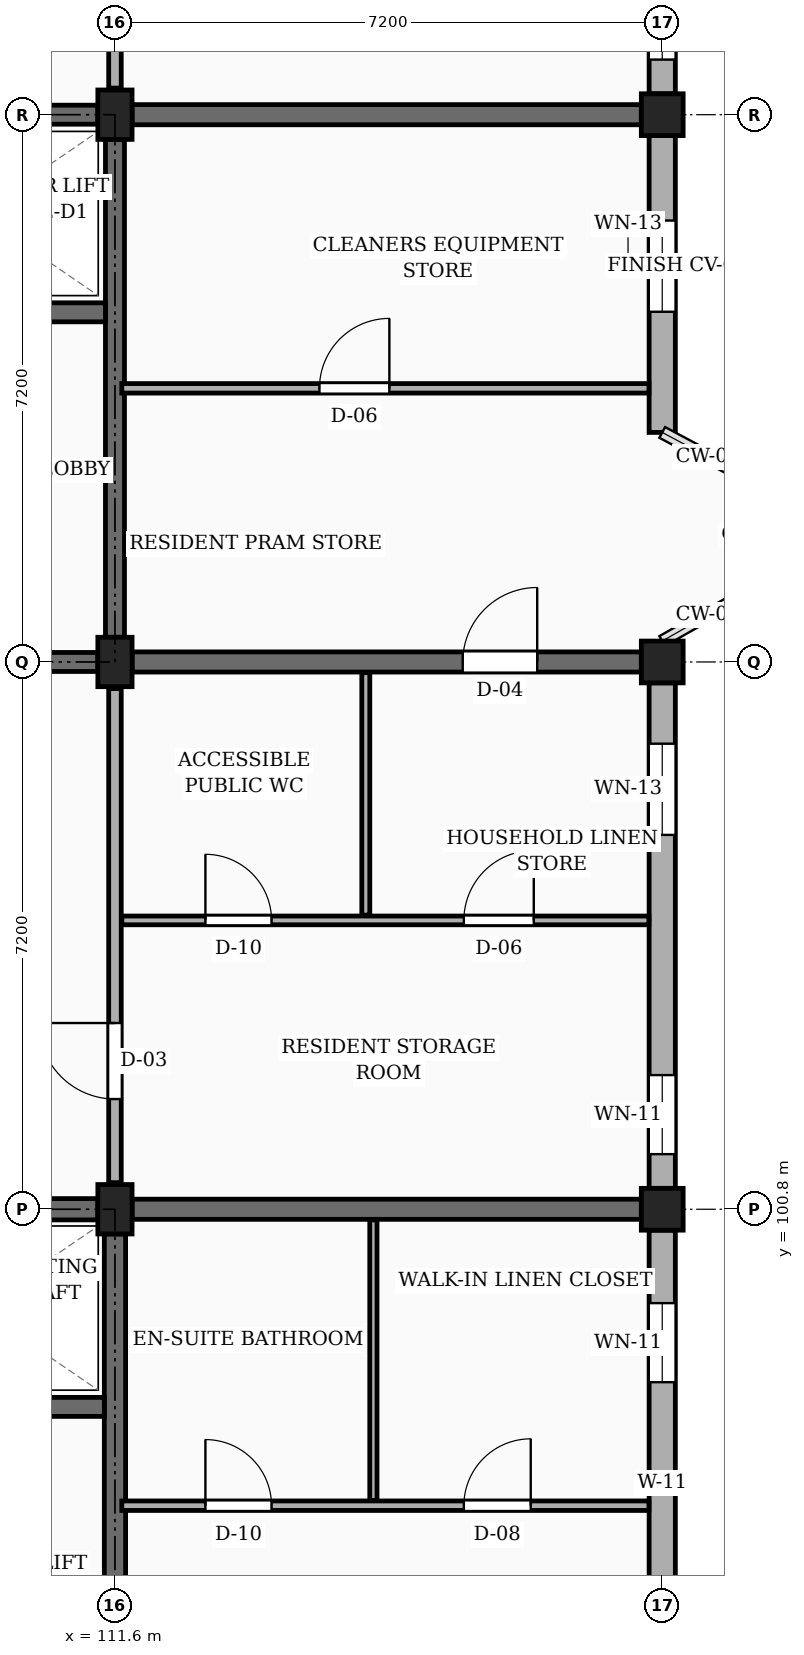
"""IFC4 building model, lengths in metres.
Left out: names, types, materials, properties, quantities, classifications, styles, units other than length and angle.
Written with IfcOpenShell. Run it as: python <this file> out.ifc"""

import sys

from ifc_helpers import new_model, si_unit, direction, frame, frame_2d, origin, origin_2d, place, context, subcontext, project, spatial, rectangle, extrude, element, fill, save


model = new_model("IFC4")
c1 = context("Model", 3, precision=1e-05, world=origin(), true_north=direction((0.0, 1.0)))
c2 = subcontext(c1, "Body", "Model", "MODEL_VIEW")
j1 = project(units=[si_unit("LENGTHUNIT", "METRE"), si_unit("PLANEANGLEUNIT", "RADIAN")], contexts=[c1])
p1 = place(None, origin())
s1 = spatial("IfcSite", under=j1, at=p1, CompositionType="ELEMENT")
p2 = place(p1, origin())
s2 = spatial("IfcBuilding", under=s1, at=p2, CompositionType="ELEMENT")
p3 = place(p2, frame((0.0, 0.0, 10.8)))
s3 = spatial("IfcBuildingStorey", under=s2, at=p3, CompositionType="ELEMENT", Elevation=10.8)
for number, where, z_axis, x_axis in (
    (1, (111.6, 100.8, 0.0), (0.0, 0.0, 1.0), (1.0, 0.0, 0.0)),
    (2, (111.6, 108.0, 0.0), (0.0, 0.0, 1.0), (1.0, 0.0, 0.0)),
    (3, (111.6, 115.2, 0.0), (0.0, 0.0, 1.0), (1.0, 0.0, 0.0)),
):
    element("IfcColumn", number, at=place(p3, frame(where, z_axis=z_axis, x_axis=x_axis)), inside=s3, PredefinedType="COLUMN", context=c2, shape_type="SweptSolid", body=[
        extrude(rectangle(XDim=0.45, YDim=0.65, at=origin_2d()), origin(), (0.0, 0.0, 1.0), 3.15),
    ])
for number, where, z_axis, x_axis in (
    (4, (118.8, 100.8, 0.0), (0.0, 0.0, 1.0), (1.0, 0.0, 0.0)),
    (5, (118.8, 108.0, 0.0), (0.0, 0.0, 1.0), (1.0, 0.0, 0.0)),
    (6, (118.8, 115.2, 0.0), (0.0, 0.0, 1.0), (1.0, 0.0, 0.0)),
):
    element("IfcColumn", number, at=place(p3, frame(where, z_axis=z_axis, x_axis=x_axis)), inside=s3, PredefinedType="COLUMN", context=c2, shape_type="SweptSolid", body=[
        extrude(rectangle(XDim=0.55, YDim=0.55, at=origin_2d()), origin(), (0.0, 0.0, 1.0), 3.15),
    ])
p4 = place(p3, frame((111.825, 100.8, 0.0), z_axis=(0.0, 0.0, 1.0), x_axis=(1.0, 0.0, 0.0)))
e7 = element("IfcWall", 7, at=p4, inside=s3, PredefinedType="SOLIDWALL", context=c2, shape_type="SweptSolid", body=[
    extrude(rectangle(XDim=6.7, YDim=0.265, at=frame_2d((3.35, 0.0))), origin(), (0.0, 0.0, 1.0), 2.19),
])
p5 = place(p3, frame((111.825, 108.0, 0.0), z_axis=(0.0, 0.0, 1.0), x_axis=(1.0, 0.0, 0.0)))
e8 = element("IfcWall", 8, at=p5, inside=s3, PredefinedType="SOLIDWALL", context=c2, shape_type="SweptSolid", body=[
    extrude(rectangle(XDim=6.7, YDim=0.265, at=frame_2d((3.35, 0.0))), origin(), (0.0, 0.0, 1.0), 2.19),
])
p6 = place(p5, frame((4.35, 0.0, 0.0)))
e9 = element("IfcOpeningElement", 9, at=p6, cuts=e8, PredefinedType="OPENING", context=c2, shape_type="SweptSolid", body=[
    extrude(rectangle(XDim=0.98, YDim=2.12, at=frame_2d((0.49, 1.06))), frame((0.0, 0.143, 0.0), z_axis=(0.0, -1.0, 0.0), x_axis=(1.0, 0.0, 0.0)), (0.0, 0.0, 1.0), 0.285),
])
p7 = place(p3, frame((111.825, 115.2, 0.0), z_axis=(0.0, 0.0, 1.0), x_axis=(1.0, 0.0, 0.0)))
e10 = element("IfcWall", 10, at=p7, inside=s3, PredefinedType="SOLIDWALL", context=c2, shape_type="SweptSolid", body=[
    extrude(rectangle(XDim=6.7, YDim=0.265, at=frame_2d((3.35, 0.0))), origin(), (0.0, 0.0, 1.0), 2.19),
])
p8 = place(p3, frame((118.8, 93.875, 0.0), z_axis=(0.0, 0.0, 1.0), x_axis=(0.0, 1.0, 0.0)))
e11 = element("IfcWall", 11, at=p8, inside=s3, PredefinedType="SOLIDWALL", context=c2, shape_type="SweptSolid", body=[
    extrude(rectangle(XDim=6.65, YDim=0.345, at=frame_2d((3.325, 0.0))), origin(), (0.0, 0.0, 1.0), 2.46),
])
p9 = place(p8, frame((0.45, 0.0, 0.78)))
e12 = element("IfcOpeningElement", 12, at=p9, cuts=e11, PredefinedType="OPENING", context=c2, shape_type="SweptSolid", body=[
    extrude(rectangle(XDim=0.88, YDim=1.26, at=frame_2d((0.44, 0.63))), frame((0.0, 0.183, 0.0), z_axis=(0.0, -1.0, 0.0), x_axis=(1.0, 0.0, 0.0)), (0.0, 0.0, 1.0), 0.365),
])
p10 = place(p8, frame((4.65, 0.0, 0.78)))
e13 = element("IfcOpeningElement", 13, at=p10, cuts=e11, PredefinedType="OPENING", context=c2, shape_type="SweptSolid", body=[
    extrude(rectangle(XDim=1.04, YDim=1.26, at=frame_2d((0.52, 0.63))), frame((0.0, 0.183, 0.0), z_axis=(0.0, -1.0, 0.0), x_axis=(1.0, 0.0, 0.0)), (0.0, 0.0, 1.0), 0.365),
])
p11 = place(p3, frame((118.8, 101.075, 0.0), z_axis=(0.0, 0.0, 1.0), x_axis=(0.0, 1.0, 0.0)))
e14 = element("IfcWall", 14, at=p11, inside=s3, PredefinedType="SOLIDWALL", context=c2, shape_type="SweptSolid", body=[
    extrude(rectangle(XDim=6.65, YDim=0.345, at=frame_2d((3.325, 0.0))), origin(), (0.0, 0.0, 1.0), 2.46),
])
p12 = place(p11, frame((0.45, 0.0, 0.78)))
e15 = element("IfcOpeningElement", 15, at=p12, cuts=e14, PredefinedType="OPENING", context=c2, shape_type="SweptSolid", body=[
    extrude(rectangle(XDim=1.04, YDim=1.26, at=frame_2d((0.52, 0.63))), frame((0.0, 0.183, 0.0), z_axis=(0.0, -1.0, 0.0), x_axis=(1.0, 0.0, 0.0)), (0.0, 0.0, 1.0), 0.365),
])
p13 = place(p11, frame((4.65, 0.0, 0.78)))
e16 = element("IfcOpeningElement", 16, at=p13, cuts=e14, PredefinedType="OPENING", context=c2, shape_type="SweptSolid", body=[
    extrude(rectangle(XDim=1.2, YDim=1.26, at=frame_2d((0.6, 0.63))), frame((0.0, 0.183, 0.0), z_axis=(0.0, -1.0, 0.0), x_axis=(1.0, 0.0, 0.0)), (0.0, 0.0, 1.0), 0.365),
])
p14 = place(p3, frame((118.8, 111.02, 0.0), z_axis=(0.0, 0.0, 1.0), x_axis=(0.0, 1.0, 0.0)))
e17 = element("IfcWall", 17, at=p14, inside=s3, PredefinedType="SOLIDWALL", context=c2, shape_type="SweptSolid", body=[
    extrude(rectangle(XDim=3.905, YDim=0.345, at=frame_2d((1.953, 0.0))), origin(), (0.0, 0.0, 1.0), 2.46),
])
p15 = place(p14, frame((1.587, 0.0, 0.78)))
e18 = element("IfcOpeningElement", 18, at=p15, cuts=e17, PredefinedType="OPENING", context=c2, shape_type="SweptSolid", body=[
    extrude(rectangle(XDim=1.2, YDim=1.26, at=frame_2d((0.6, 0.63))), frame((0.0, 0.183, 0.0), z_axis=(0.0, -1.0, 0.0), x_axis=(1.0, 0.0, 0.0)), (0.0, 0.0, 1.0), 0.365),
])
p16 = place(p3, frame((118.8, 115.475, 0.0), z_axis=(0.0, 0.0, 1.0), x_axis=(0.0, 1.0, 0.0)))
e19 = element("IfcWall", 19, at=p16, inside=s3, PredefinedType="SOLIDWALL", context=c2, shape_type="SweptSolid", body=[
    extrude(rectangle(XDim=6.65, YDim=0.345, at=frame_2d((3.325, 0.0))), origin(), (0.0, 0.0, 1.0), 2.46),
])
p17 = place(p16, frame((0.45, 0.0, 0.78)))
e20 = element("IfcOpeningElement", 20, at=p17, cuts=e19, PredefinedType="OPENING", context=c2, shape_type="SweptSolid", body=[
    extrude(rectangle(XDim=1.28, YDim=1.26, at=frame_2d((0.64, 0.63))), frame((0.0, 0.183, 0.0), z_axis=(0.0, -1.0, 0.0), x_axis=(1.0, 0.0, 0.0)), (0.0, 0.0, 1.0), 0.365),
])
p18 = place(p16, frame((4.65, 0.0, 0.78)))
e21 = element("IfcOpeningElement", 21, at=p18, cuts=e19, PredefinedType="OPENING", context=c2, shape_type="SweptSolid", body=[
    extrude(rectangle(XDim=1.44, YDim=1.26, at=frame_2d((0.72, 0.63))), frame((0.0, 0.183, 0.0), z_axis=(0.0, -1.0, 0.0), x_axis=(1.0, 0.0, 0.0)), (0.0, 0.0, 1.0), 0.365),
])
p19 = place(p3, frame((104.625, 100.8, 0.0), z_axis=(0.0, 0.0, 1.0), x_axis=(1.0, 0.0, 0.0)))
e22 = element("IfcWall", 22, at=p19, inside=s3, PredefinedType="SHEAR", context=c2, shape_type="SweptSolid", body=[
    extrude(rectangle(XDim=6.75, YDim=0.28, at=frame_2d((3.375, 0.0))), origin(), (0.0, 0.0, 1.0), 2.89),
])
p20 = place(p3, frame((111.6, 93.925, 0.0), z_axis=(0.0, 0.0, 1.0), x_axis=(0.0, 1.0, 0.0)))
e23 = element("IfcWall", 23, at=p20, inside=s3, PredefinedType="SHEAR", context=c2, shape_type="SweptSolid", body=[
    extrude(rectangle(XDim=6.55, YDim=0.28, at=frame_2d((3.275, 0.0))), origin(), (0.0, 0.0, 1.0), 2.89),
])
p21 = place(p3, frame((108.125, 98.2, 0.0), z_axis=(0.0, 0.0, 1.0), x_axis=(1.0, 0.0, 0.0)))
e24 = element("IfcWall", 24, at=p21, inside=s3, PredefinedType="SHEAR", context=c2, shape_type="SweptSolid", body=[
    extrude(rectangle(XDim=3.335, YDim=0.25, at=frame_2d((1.667, 0.0))), origin(), (0.0, 0.0, 1.0), 2.89),
])
p22 = place(p21, frame((1.1, 0.0, 0.0)))
e25 = element("IfcOpeningElement", 25, at=p22, cuts=e24, PredefinedType="OPENING", context=c2, shape_type="SweptSolid", body=[
    extrude(rectangle(XDim=1.1, YDim=2.2, at=frame_2d((0.55, 1.1))), frame((0.0, 0.135, 0.0), z_axis=(0.0, -1.0, 0.0), x_axis=(1.0, 0.0, 0.0)), (0.0, 0.0, 1.0), 0.27),
])
p23 = place(p3, frame((104.625, 115.2, 0.0), z_axis=(0.0, 0.0, 1.0), x_axis=(1.0, 0.0, 0.0)))
e26 = element("IfcWall", 26, at=p23, inside=s3, PredefinedType="SHEAR", context=c2, shape_type="SweptSolid", body=[
    extrude(rectangle(XDim=6.75, YDim=0.25, at=frame_2d((3.375, 0.0))), origin(), (0.0, 0.0, 1.0), 2.89),
])
p24 = place(p3, frame((111.6, 108.325, 0.0), z_axis=(0.0, 0.0, 1.0), x_axis=(0.0, 1.0, 0.0)))
e27 = element("IfcWall", 27, at=p24, inside=s3, PredefinedType="SHEAR", context=c2, shape_type="SweptSolid", body=[
    extrude(rectangle(XDim=6.55, YDim=0.25, at=frame_2d((3.275, 0.0))), origin(), (0.0, 0.0, 1.0), 2.89),
])
p25 = place(p3, frame((104.625, 108.0, 0.0), z_axis=(0.0, 0.0, 1.0), x_axis=(1.0, 0.0, 0.0)))
e28 = element("IfcWall", 28, at=p25, inside=s3, PredefinedType="SHEAR", context=c2, shape_type="SweptSolid", body=[
    extrude(rectangle(XDim=6.75, YDim=0.25, at=frame_2d((3.375, 0.0))), origin(), (0.0, 0.0, 1.0), 2.89),
])
p26 = place(p25, frame((4.525, 0.0, 0.0)))
e29 = element("IfcOpeningElement", 29, at=p26, cuts=e28, PredefinedType="OPENING", context=c2, shape_type="SweptSolid", body=[
    extrude(rectangle(XDim=1.1, YDim=2.15, at=frame_2d((0.55, 1.075))), frame((0.0, 0.135, 0.0), z_axis=(0.0, -1.0, 0.0), x_axis=(1.0, 0.0, 0.0)), (0.0, 0.0, 1.0), 0.27),
])
p27 = place(p3, frame((108.125, 112.6, 0.0), z_axis=(0.0, 0.0, 1.0), x_axis=(1.0, 0.0, 0.0)))
e30 = element("IfcWall", 30, at=p27, inside=s3, PredefinedType="SHEAR", context=c2, shape_type="SweptSolid", body=[
    extrude(rectangle(XDim=3.35, YDim=0.25, at=frame_2d((1.675, 0.0))), origin(), (0.0, 0.0, 1.0), 2.89),
])
p28 = place(p27, frame((1.1, 0.0, 0.0)))
e31 = element("IfcOpeningElement", 31, at=p28, cuts=e30, PredefinedType="OPENING", context=c2, shape_type="SweptSolid", body=[
    extrude(rectangle(XDim=1.0, YDim=2.2, at=frame_2d((0.5, 1.1))), frame((0.0, 0.135, 0.0), z_axis=(0.0, -1.0, 0.0), x_axis=(1.0, 0.0, 0.0)), (0.0, 0.0, 1.0), 0.27),
])
p29 = place(p3, frame((111.6, 101.15, 0.0), z_axis=(0.0, 0.0, 1.0), x_axis=(0.0, 1.0, 0.0)))
e32 = element("IfcWall", 32, at=p29, inside=s3, PredefinedType="PARTITIONING", context=c2, shape_type="SweptSolid", body=[
    extrude(rectangle(XDim=6.5, YDim=0.165, at=frame_2d((3.25, 0.0))), origin(), (0.0, 0.0, 1.0), 2.24),
])
p30 = place(p29, frame((1.1, 0.0, 0.0)))
e33 = element("IfcOpeningElement", 33, at=p30, cuts=e32, PredefinedType="OPENING", context=c2, shape_type="SweptSolid", body=[
    extrude(rectangle(XDim=1.0, YDim=2.15, at=frame_2d((0.5, 1.075))), frame((0.0, 0.093, 0.0), z_axis=(0.0, -1.0, 0.0), x_axis=(1.0, 0.0, 0.0)), (0.0, 0.0, 1.0), 0.185),
])
p31 = place(p3, frame((111.6, 115.55, 0.0), z_axis=(0.0, 0.0, 1.0), x_axis=(0.0, 1.0, 0.0)))
e34 = element("IfcWall", 34, at=p31, inside=s3, PredefinedType="PARTITIONING", context=c2, shape_type="SweptSolid", body=[
    extrude(rectangle(XDim=6.5, YDim=0.165, at=frame_2d((3.25, 0.0))), origin(), (0.0, 0.0, 1.0), 2.24),
])
p32 = place(p31, frame((1.1, 0.0, 0.0)))
e35 = element("IfcOpeningElement", 35, at=p32, cuts=e34, PredefinedType="OPENING", context=c2, shape_type="SweptSolid", body=[
    extrude(rectangle(XDim=0.94, YDim=2.12, at=frame_2d((0.47, 1.06))), frame((0.0, 0.093, 0.0), z_axis=(0.0, -1.0, 0.0), x_axis=(1.0, 0.0, 0.0)), (0.0, 0.0, 1.0), 0.185),
])
p33 = place(p3, frame((111.69, 96.9, 0.0), z_axis=(0.0, 0.0, 1.0), x_axis=(1.0, 0.0, 0.0)))
e36 = element("IfcWall", 36, at=p33, inside=s3, PredefinedType="PARTITIONING", context=c2, shape_type="SweptSolid", body=[
    extrude(rectangle(XDim=6.935, YDim=0.125, at=frame_2d((3.468, 0.0))), origin(), (0.0, 0.0, 1.0), 2.325),
])
p34 = place(p33, frame((1.1, 0.0, 0.0)))
e37 = element("IfcOpeningElement", 37, at=p34, cuts=e36, PredefinedType="OPENING", context=c2, shape_type="SweptSolid", body=[
    extrude(rectangle(XDim=0.87, YDim=2.05, at=frame_2d((0.435, 1.025))), frame((0.0, 0.073, 0.0), z_axis=(0.0, -1.0, 0.0), x_axis=(1.0, 0.0, 0.0)), (0.0, 0.0, 1.0), 0.145),
])
p35 = place(p33, frame((4.5, 0.0, 0.0)))
e38 = element("IfcOpeningElement", 38, at=p35, cuts=e36, PredefinedType="OPENING", context=c2, shape_type="SweptSolid", body=[
    extrude(rectangle(XDim=0.88, YDim=2.08, at=frame_2d((0.44, 1.04))), frame((0.0, 0.073, 0.0), z_axis=(0.0, -1.0, 0.0), x_axis=(1.0, 0.0, 0.0)), (0.0, 0.0, 1.0), 0.145),
])
p36 = place(p3, frame((115.0, 96.97, 0.0), z_axis=(0.0, 0.0, 1.0), x_axis=(0.0, 1.0, 0.0)))
e39 = element("IfcWall", 39, at=p36, inside=s3, PredefinedType="PARTITIONING", context=c2, shape_type="SweptSolid", body=[
    extrude(rectangle(XDim=3.69, YDim=0.095, at=frame_2d((1.845, 0.0))), origin(), (0.0, 0.0, 1.0), 2.325),
])
p37 = place(p3, frame((111.69, 104.6, 0.0), z_axis=(0.0, 0.0, 1.0), x_axis=(1.0, 0.0, 0.0)))
e40 = element("IfcWall", 40, at=p37, inside=s3, PredefinedType="PARTITIONING", context=c2, shape_type="SweptSolid", body=[
    extrude(rectangle(XDim=6.935, YDim=0.115, at=frame_2d((3.468, 0.0))), origin(), (0.0, 0.0, 1.0), 2.325),
])
p38 = place(p37, frame((1.1, 0.0, 0.0)))
e41 = element("IfcOpeningElement", 41, at=p38, cuts=e40, PredefinedType="OPENING", context=c2, shape_type="SweptSolid", body=[
    extrude(rectangle(XDim=0.87, YDim=2.05, at=frame_2d((0.435, 1.025))), frame((0.0, 0.067, 0.0), z_axis=(0.0, -1.0, 0.0), x_axis=(1.0, 0.0, 0.0)), (0.0, 0.0, 1.0), 0.135),
])
p39 = place(p37, frame((4.5, 0.0, 0.0)))
e42 = element("IfcOpeningElement", 42, at=p39, cuts=e40, PredefinedType="OPENING", context=c2, shape_type="SweptSolid", body=[
    extrude(rectangle(XDim=0.92, YDim=2.1, at=frame_2d((0.46, 1.05))), frame((0.0, 0.067, 0.0), z_axis=(0.0, -1.0, 0.0), x_axis=(1.0, 0.0, 0.0)), (0.0, 0.0, 1.0), 0.135),
])
p40 = place(p3, frame((114.9, 104.67, 0.0), z_axis=(0.0, 0.0, 1.0), x_axis=(0.0, 1.0, 0.0)))
e43 = element("IfcWall", 43, at=p40, inside=s3, PredefinedType="PARTITIONING", context=c2, shape_type="SweptSolid", body=[
    extrude(rectangle(XDim=3.19, YDim=0.105, at=frame_2d((1.595, 0.0))), origin(), (0.0, 0.0, 1.0), 2.325),
])
p41 = place(p3, frame((111.69, 111.6, 0.0), z_axis=(0.0, 0.0, 1.0), x_axis=(1.0, 0.0, 0.0)))
e44 = element("IfcWall", 44, at=p41, inside=s3, PredefinedType="PARTITIONING", context=c2, shape_type="SweptSolid", body=[
    extrude(rectangle(XDim=6.935, YDim=0.125, at=frame_2d((3.468, 0.0))), origin(), (0.0, 0.0, 1.0), 2.325),
])
p42 = place(p41, frame((2.6, 0.0, 0.0)))
e45 = element("IfcOpeningElement", 45, at=p42, cuts=e44, PredefinedType="OPENING", context=c2, shape_type="SweptSolid", body=[
    extrude(rectangle(XDim=0.92, YDim=2.1, at=frame_2d((0.46, 1.05))), frame((0.0, 0.073, 0.0), z_axis=(0.0, -1.0, 0.0), x_axis=(1.0, 0.0, 0.0)), (0.0, 0.0, 1.0), 0.145),
])
p43 = place(p10, origin())
e46 = element("IfcWindow", 46, at=p43, inside=s3, PartitioningType="SINGLE_PANEL", PredefinedType="WINDOW", context=c2, shape_type="SweptSolid", body=[
    extrude(rectangle(XDim=1.04, YDim=1.26, at=frame_2d((0.52, 0.63))), frame((0.0, 0.03, 0.0), z_axis=(0.0, -1.0, 0.0), x_axis=(1.0, 0.0, 0.0)), (0.0, 0.0, 1.0), 0.06),
])
fill(e13, e46)
p44 = place(p12, origin())
e47 = element("IfcWindow", 47, at=p44, inside=s3, PartitioningType="SINGLE_PANEL", PredefinedType="WINDOW", context=c2, shape_type="SweptSolid", body=[
    extrude(rectangle(XDim=1.04, YDim=1.26, at=frame_2d((0.52, 0.63))), frame((0.0, 0.03, 0.0), z_axis=(0.0, -1.0, 0.0), x_axis=(1.0, 0.0, 0.0)), (0.0, 0.0, 1.0), 0.06),
])
fill(e15, e47)
p45 = place(p13, origin())
e48 = element("IfcWindow", 48, at=p45, inside=s3, PartitioningType="SINGLE_PANEL", PredefinedType="WINDOW", context=c2, shape_type="SweptSolid", body=[
    extrude(rectangle(XDim=1.2, YDim=1.26, at=frame_2d((0.6, 0.63))), frame((0.0, 0.03, 0.0), z_axis=(0.0, -1.0, 0.0), x_axis=(1.0, 0.0, 0.0)), (0.0, 0.0, 1.0), 0.06),
])
fill(e16, e48)
p46 = place(p15, origin())
e49 = element("IfcWindow", 49, at=p46, inside=s3, PartitioningType="SINGLE_PANEL", PredefinedType="WINDOW", context=c2, shape_type="SweptSolid", body=[
    extrude(rectangle(XDim=1.2, YDim=1.26, at=frame_2d((0.6, 0.63))), frame((0.0, 0.03, 0.0), z_axis=(0.0, -1.0, 0.0), x_axis=(1.0, 0.0, 0.0)), (0.0, 0.0, 1.0), 0.06),
])
fill(e18, e49)
p47 = place(p17, origin())
e50 = element("IfcWindow", 50, at=p47, inside=s3, PartitioningType="SINGLE_PANEL", PredefinedType="WINDOW", context=c2, shape_type="SweptSolid", body=[
    extrude(rectangle(XDim=1.28, YDim=1.26, at=frame_2d((0.64, 0.63))), frame((0.0, 0.03, 0.0), z_axis=(0.0, -1.0, 0.0), x_axis=(1.0, 0.0, 0.0)), (0.0, 0.0, 1.0), 0.06),
])
fill(e20, e50)
p48 = place(p30, origin())
e51 = element("IfcDoor", 51, at=p48, inside=s3, OperationType="SINGLE_SWING_RIGHT", PredefinedType="DOOR", context=c2, shape_type="SweptSolid", body=[
    extrude(rectangle(XDim=1.0, YDim=2.15, at=frame_2d((0.5, 1.075))), frame((0.0, 0.025, 0.0), z_axis=(0.0, -1.0, 0.0), x_axis=(1.0, 0.0, 0.0)), (0.0, 0.0, 1.0), 0.05),
])
fill(e33, e51)
p49 = place(p34, origin())
e52 = element("IfcDoor", 52, at=p49, inside=s3, OperationType="SINGLE_SWING_LEFT", PredefinedType="DOOR", context=c2, shape_type="SweptSolid", body=[
    extrude(rectangle(XDim=0.87, YDim=2.05, at=frame_2d((0.435, 1.025))), frame((0.0, 0.025, 0.0), z_axis=(0.0, -1.0, 0.0), x_axis=(1.0, 0.0, 0.0)), (0.0, 0.0, 1.0), 0.05),
])
fill(e37, e52)
p50 = place(p35, origin())
e53 = element("IfcDoor", 53, at=p50, inside=s3, OperationType="SINGLE_SWING_RIGHT", PredefinedType="DOOR", context=c2, shape_type="SweptSolid", body=[
    extrude(rectangle(XDim=0.88, YDim=2.08, at=frame_2d((0.44, 1.04))), frame((0.0, 0.025, 0.0), z_axis=(0.0, -1.0, 0.0), x_axis=(1.0, 0.0, 0.0)), (0.0, 0.0, 1.0), 0.05),
])
fill(e38, e53)
p51 = place(p38, origin())
e54 = element("IfcDoor", 54, at=p51, inside=s3, OperationType="SINGLE_SWING_LEFT", PredefinedType="DOOR", context=c2, shape_type="SweptSolid", body=[
    extrude(rectangle(XDim=0.87, YDim=2.05, at=frame_2d((0.435, 1.025))), frame((0.0, 0.025, 0.0), z_axis=(0.0, -1.0, 0.0), x_axis=(1.0, 0.0, 0.0)), (0.0, 0.0, 1.0), 0.05),
])
fill(e41, e54)
p52 = place(p39, origin())
e55 = element("IfcDoor", 55, at=p52, inside=s3, OperationType="SINGLE_SWING_RIGHT", PredefinedType="DOOR", context=c2, shape_type="SweptSolid", body=[
    extrude(rectangle(XDim=0.92, YDim=2.1, at=frame_2d((0.46, 1.05))), frame((0.0, 0.025, 0.0), z_axis=(0.0, -1.0, 0.0), x_axis=(1.0, 0.0, 0.0)), (0.0, 0.0, 1.0), 0.05),
])
fill(e42, e55)
p53 = place(p42, origin())
e56 = element("IfcDoor", 56, at=p53, inside=s3, OperationType="SINGLE_SWING_RIGHT", PredefinedType="DOOR", context=c2, shape_type="SweptSolid", body=[
    extrude(rectangle(XDim=0.92, YDim=2.1, at=frame_2d((0.46, 1.05))), frame((0.0, 0.025, 0.0), z_axis=(0.0, -1.0, 0.0), x_axis=(1.0, 0.0, 0.0)), (0.0, 0.0, 1.0), 0.05),
])
fill(e45, e56)
p54 = place(p6, origin())
e57 = element("IfcDoor", 57, at=p54, inside=s3, OperationType="SINGLE_SWING_RIGHT", PredefinedType="DOOR", context=c2, shape_type="SweptSolid", body=[
    extrude(rectangle(XDim=0.98, YDim=2.12, at=frame_2d((0.49, 1.06))), frame((0.0, 0.025, 0.0), z_axis=(0.0, -1.0, 0.0), x_axis=(1.0, 0.0, 0.0)), (0.0, 0.0, 1.0), 0.05),
])
fill(e9, e57)
save(model, sys.argv[1])
